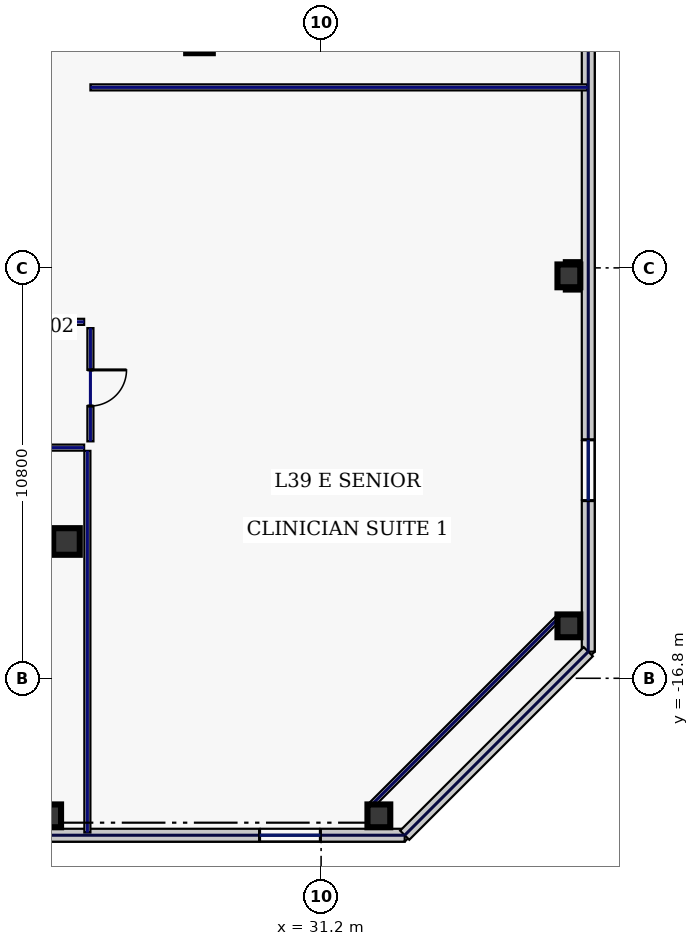
"""IFC4 building model, lengths in metres.
Left out: names, types, materials, properties, quantities, classifications, styles, units other than length and angle.
Written with IfcOpenShell. Run it as: python <this file> out.ifc"""

import sys

from ifc_helpers import new_model, si_unit, direction, frame, frame_2d, origin, origin_2d, place, context, subcontext, project, spatial, rectangle, hollow_rectangle, extrude, element, fill, save


model = new_model("IFC4")
c1 = context("Model", 3, precision=1e-05, world=origin(), true_north=direction((0.0, 1.0)))
c2 = subcontext(c1, "Body", "Model", "MODEL_VIEW")
j1 = project(units=[si_unit("LENGTHUNIT", "METRE"), si_unit("PLANEANGLEUNIT", "RADIAN")], contexts=[c1])
p1 = place(None, origin())
s1 = spatial("IfcSite", under=j1, at=p1, CompositionType="ELEMENT")
p2 = place(p1, origin())
s2 = spatial("IfcBuilding", under=s1, at=p2, CompositionType="ELEMENT")
p3 = place(p2, frame((0.0, 0.0, 172.2)))
s3 = spatial("IfcBuildingStorey", under=s2, at=p3, CompositionType="ELEMENT", Elevation=172.2)
for number, where, z_axis, x_axis in (
    (1, (24.5, -13.2, 0.0), (0.0, 0.0, 1.0), (1.0, 0.0, 0.0)),
    (2, (28.0, 0.0, 0.0), (0.0, 0.0, 1.0), (1.0, 0.0, 0.0)),
):
    element("IfcColumn", number, at=place(p3, frame(where, z_axis=z_axis, x_axis=x_axis)), inside=s3, PredefinedType="COLUMN", context=c2, shape_type="SweptSolid", body=[
        extrude(hollow_rectangle(XDim=0.7, YDim=0.7, WallThickness=0.032, at=origin_2d()), origin(), (0.0, 0.0, 1.0), 3.74),
    ])
for number, where, z_axis, x_axis in (
    (3, (24.057, -20.42, 0.0), (0.0, 0.0, 1.0), (1.0, 0.0, 0.0)),
    (4, (32.72, -20.42, 0.0), (0.0, 0.0, 1.0), (1.0, 0.0, 0.0)),
    (5, (37.72, -15.42, 0.0), (0.0, 0.0, 1.0), (1.0, 0.0, 0.0)),
    (6, (37.72, -6.21, 0.0), (0.0, 0.0, 1.0), (1.0, 0.0, 0.0)),
):
    element("IfcColumn", number, at=place(p3, frame(where, z_axis=z_axis, x_axis=x_axis)), inside=s3, PredefinedType="COLUMN", context=c2, shape_type="SweptSolid", body=[
        extrude(hollow_rectangle(XDim=0.6, YDim=0.6, WallThickness=0.028, at=origin_2d()), origin(), (0.0, 0.0, 1.0), 3.74),
    ])
p4 = place(p3, frame((13.463, -20.93, 0.0), z_axis=(0.0, 0.0, 1.0), x_axis=(1.0, 0.0, 0.0)))
e7 = element("IfcWall", 7, at=p4, inside=s3, PredefinedType="STANDARD", context=c2, shape_type="SweptSolid", body=[
    extrude(rectangle(XDim=19.937, YDim=0.34, at=frame_2d((9.969, 0.0))), origin(), (0.0, 0.0, 1.0), 3.74),
])
p5 = place(p4, frame((3.47, 0.0, 0.22)))
e8 = element("IfcOpeningElement", 8, at=p5, cuts=e7, PredefinedType="OPENING", context=c2, shape_type="SweptSolid", body=[
    extrude(rectangle(XDim=1.6, YDim=1.2, at=frame_2d((0.8, 0.6))), frame((0.0, 0.18, 0.0), z_axis=(0.0, -1.0, 0.0), x_axis=(1.0, 0.0, 0.0)), (0.0, 0.0, 1.0), 0.36),
])
p6 = place(p4, frame((16.118, 0.0, 0.22)))
e9 = element("IfcOpeningElement", 9, at=p6, cuts=e7, PredefinedType="OPENING", context=c2, shape_type="SweptSolid", body=[
    extrude(rectangle(XDim=1.6, YDim=1.2, at=frame_2d((0.8, 0.6))), frame((0.0, 0.18, 0.0), z_axis=(0.0, -1.0, 0.0), x_axis=(1.0, 0.0, 0.0)), (0.0, 0.0, 1.0), 0.36),
])
p7 = place(p3, frame((38.23, -16.1, 0.0), z_axis=(0.0, 0.0, 1.0), x_axis=(0.0, 1.0, 0.0)))
e10 = element("IfcWall", 10, at=p7, inside=s3, PredefinedType="STANDARD", context=c2, shape_type="SweptSolid", body=[
    extrude(rectangle(XDim=38.2, YDim=0.34, at=frame_2d((19.1, 0.0))), origin(), (0.0, 0.0, 1.0), 3.74),
])
p8 = place(p7, frame((3.975, 0.0, 0.22)))
e11 = element("IfcOpeningElement", 11, at=p8, cuts=e10, PredefinedType="OPENING", context=c2, shape_type="SweptSolid", body=[
    extrude(rectangle(XDim=1.6, YDim=1.2, at=frame_2d((0.8, 0.6))), frame((0.0, 0.18, 0.0), z_axis=(0.0, -1.0, 0.0), x_axis=(1.0, 0.0, 0.0)), (0.0, 0.0, 1.0), 0.36),
])
p9 = place(p7, frame((23.075, 0.0, 0.22)))
e12 = element("IfcOpeningElement", 12, at=p9, cuts=e10, PredefinedType="OPENING", context=c2, shape_type="SweptSolid", body=[
    extrude(rectangle(XDim=1.6, YDim=1.2, at=frame_2d((0.8, 0.6))), frame((0.0, 0.18, 0.0), z_axis=(0.0, -1.0, 0.0), x_axis=(1.0, 0.0, 0.0)), (0.0, 0.0, 1.0), 0.36),
])
p10 = place(p7, frame((32.625, 0.0, 0.22)))
e13 = element("IfcOpeningElement", 13, at=p10, cuts=e10, PredefinedType="OPENING", context=c2, shape_type="SweptSolid", body=[
    extrude(rectangle(XDim=1.6, YDim=1.2, at=frame_2d((0.8, 0.6))), frame((0.0, 0.18, 0.0), z_axis=(0.0, -1.0, 0.0), x_axis=(1.0, 0.0, 0.0)), (0.0, 0.0, 1.0), 0.36),
])
p11 = place(p3, frame((33.4, -20.93, 0.0), z_axis=(0.0, 0.0, 1.0), x_axis=(0.707124652085, 0.707088909836, 0.0)))
e14 = element("IfcWall", 14, at=p11, inside=s3, PredefinedType="STANDARD", context=c2, shape_type="SweptSolid", body=[
    extrude(rectangle(XDim=6.831, YDim=0.34, at=frame_2d((3.415, 0.0))), origin(), (0.0, 0.0, 1.0), 3.74),
])
p12 = place(p3, frame((32.479, -20.18, 0.0), z_axis=(0.0, 0.0, 1.0), x_axis=(0.707106781187, 0.707106781187, 0.0)))
e15 = element("IfcWall", 15, at=p12, inside=s3, PredefinedType="PARTITIONING", context=c2, shape_type="SweptSolid", body=[
    extrude(rectangle(XDim=7.071, YDim=0.16, at=frame_2d((3.536, 0.0))), origin(), (0.0, 0.0, 1.0), 1.535),
])
p13 = place(p3, frame((10.715, -7.42, 0.0), z_axis=(0.0, 0.0, 1.0), x_axis=(1.0, 0.0, 0.0)))
e16 = element("IfcWall", 16, at=p13, inside=s3, PredefinedType="PARTITIONING", context=c2, shape_type="SweptSolid", body=[
    extrude(rectangle(XDim=14.25, YDim=0.16, at=frame_2d((7.125, 0.0))), origin(), (0.0, 0.0, 1.0), 3.74),
])
p14 = place(p3, frame((25.13, -7.585, 0.0), z_axis=(0.0, 0.0, 1.0), x_axis=(0.0, -1.0, 0.0)))
e17 = element("IfcWall", 17, at=p14, inside=s3, PredefinedType="PARTITIONING", context=c2, shape_type="SweptSolid", body=[
    extrude(rectangle(XDim=2.98, YDim=0.16, at=frame_2d((1.49, 0.0))), origin(), (0.0, 0.0, 1.0), 3.74),
])
p15 = place(p14, frame((1.1, 0.0, 0.0)))
e18 = element("IfcOpeningElement", 18, at=p15, cuts=e17, PredefinedType="OPENING", context=c2, shape_type="SweptSolid", body=[
    extrude(rectangle(XDim=0.95, YDim=2.2, at=frame_2d((0.475, 1.1))), frame((0.0, 0.09, 0.0), z_axis=(0.0, -1.0, 0.0), x_axis=(1.0, 0.0, 0.0)), (0.0, 0.0, 1.0), 0.18),
])
p16 = place(p3, frame((24.965, -10.73, 0.0), z_axis=(0.0, 0.0, 1.0), x_axis=(-1.0, 0.0, 0.0)))
e19 = element("IfcWall", 19, at=p16, inside=s3, PredefinedType="PARTITIONING", context=c2, shape_type="SweptSolid", body=[
    extrude(rectangle(XDim=49.93, YDim=0.16, at=frame_2d((24.965, 0.0))), origin(), (0.0, 0.0, 1.0), 3.74),
])
p17 = place(p16, frame((47.106, 0.0, 0.0)))
e20 = element("IfcOpeningElement", 20, at=p17, cuts=e19, PredefinedType="OPENING", context=c2, shape_type="SweptSolid", body=[
    extrude(rectangle(XDim=0.95, YDim=2.2, at=frame_2d((0.475, 1.1))), frame((0.0, 0.09, 0.0), z_axis=(0.0, -1.0, 0.0), x_axis=(1.0, 0.0, 0.0)), (0.0, 0.0, 1.0), 0.18),
])
p18 = place(p16, frame((40.775, 0.0, 0.0)))
e21 = element("IfcOpeningElement", 21, at=p18, cuts=e19, PredefinedType="OPENING", context=c2, shape_type="SweptSolid", body=[
    extrude(rectangle(XDim=1.45, YDim=2.2, at=frame_2d((0.725, 1.1))), frame((0.0, 0.09, 0.0), z_axis=(0.0, -1.0, 0.0), x_axis=(1.0, 0.0, 0.0)), (0.0, 0.0, 1.0), 0.18),
])
p19 = place(p16, frame((33.175, 0.0, 0.0)))
e22 = element("IfcOpeningElement", 22, at=p19, cuts=e19, PredefinedType="OPENING", context=c2, shape_type="SweptSolid", body=[
    extrude(rectangle(XDim=1.3, YDim=2.2, at=frame_2d((0.65, 1.1))), frame((0.0, 0.09, 0.0), z_axis=(0.0, -1.0, 0.0), x_axis=(1.0, 0.0, 0.0)), (0.0, 0.0, 1.0), 0.18),
])
p20 = place(p16, frame((25.425, 0.0, 0.0)))
e23 = element("IfcOpeningElement", 23, at=p20, cuts=e19, PredefinedType="OPENING", context=c2, shape_type="SweptSolid", body=[
    extrude(rectangle(XDim=1.3, YDim=2.2, at=frame_2d((0.65, 1.1))), frame((0.0, 0.09, 0.0), z_axis=(0.0, -1.0, 0.0), x_axis=(1.0, 0.0, 0.0)), (0.0, 0.0, 1.0), 0.18),
])
p21 = place(p16, frame((17.7, 0.0, 0.0)))
e24 = element("IfcOpeningElement", 24, at=p21, cuts=e19, PredefinedType="OPENING", context=c2, shape_type="SweptSolid", body=[
    extrude(rectangle(XDim=1.15, YDim=2.2, at=frame_2d((0.575, 1.1))), frame((0.0, 0.09, 0.0), z_axis=(0.0, -1.0, 0.0), x_axis=(1.0, 0.0, 0.0)), (0.0, 0.0, 1.0), 0.18),
])
p22 = place(p16, frame((9.075, 0.0, 0.0)))
e25 = element("IfcOpeningElement", 25, at=p22, cuts=e19, PredefinedType="OPENING", context=c2, shape_type="SweptSolid", body=[
    extrude(rectangle(XDim=0.95, YDim=2.2, at=frame_2d((0.475, 1.1))), frame((0.0, 0.09, 0.0), z_axis=(0.0, -1.0, 0.0), x_axis=(1.0, 0.0, 0.0)), (0.0, 0.0, 1.0), 0.18),
])
p23 = place(p16, frame((2.044, 0.0, 0.0)))
e26 = element("IfcOpeningElement", 26, at=p23, cuts=e19, PredefinedType="OPENING", context=c2, shape_type="SweptSolid", body=[
    extrude(rectangle(XDim=1.05, YDim=2.2, at=frame_2d((0.525, 1.1))), frame((0.0, 0.09, 0.0), z_axis=(0.0, -1.0, 0.0), x_axis=(1.0, 0.0, 0.0)), (0.0, 0.0, 1.0), 0.18),
])
p24 = place(p3, frame((25.05, -20.86, 0.0), z_axis=(0.0, 0.0, 1.0), x_axis=(0.0, 1.0, 0.0)))
e27 = element("IfcWall", 27, at=p24, inside=s3, PredefinedType="PARTITIONING", context=c2, shape_type="SweptSolid", body=[
    extrude(rectangle(XDim=10.045, YDim=0.16, at=frame_2d((5.022, 0.0))), origin(), (0.0, 0.0, 1.0), 3.74),
])
p25 = place(p3, frame((25.13, -1.25, 0.0), z_axis=(0.0, 0.0, 1.0), x_axis=(1.0, 0.0, 0.0)))
e28 = element("IfcWall", 28, at=p25, inside=s3, PredefinedType="PARTITIONING", context=c2, shape_type="SweptSolid", body=[
    extrude(rectangle(XDim=13.08, YDim=0.16, at=frame_2d((6.54, 0.0))), origin(), (0.0, 0.0, 1.0), 3.74),
])
p26 = place(p6, origin())
e29 = element("IfcWindow", 29, at=p26, inside=s3, PartitioningType="SINGLE_PANEL", PredefinedType="WINDOW", context=c2, shape_type="SweptSolid", body=[
    extrude(rectangle(XDim=1.6, YDim=1.2, at=frame_2d((0.8, 0.6))), frame((0.0, 0.03, 0.0), z_axis=(0.0, -1.0, 0.0), x_axis=(1.0, 0.0, 0.0)), (0.0, 0.0, 1.0), 0.06),
])
fill(e9, e29)
p27 = place(p8, origin())
e30 = element("IfcWindow", 30, at=p27, inside=s3, PartitioningType="SINGLE_PANEL", PredefinedType="WINDOW", context=c2, shape_type="SweptSolid", body=[
    extrude(rectangle(XDim=1.6, YDim=1.2, at=frame_2d((0.8, 0.6))), frame((0.0, 0.03, 0.0), z_axis=(0.0, -1.0, 0.0), x_axis=(1.0, 0.0, 0.0)), (0.0, 0.0, 1.0), 0.06),
])
fill(e11, e30)
p28 = place(p15, origin())
e31 = element("IfcDoor", 31, at=p28, inside=s3, OperationType="SINGLE_SWING_LEFT", PredefinedType="DOOR", context=c2, shape_type="SweptSolid", body=[
    extrude(rectangle(XDim=0.95, YDim=2.2, at=frame_2d((0.475, 1.1))), frame((0.0, 0.025, 0.0), z_axis=(0.0, -1.0, 0.0), x_axis=(1.0, 0.0, 0.0)), (0.0, 0.0, 1.0), 0.05),
])
fill(e18, e31)
save(model, sys.argv[1])
